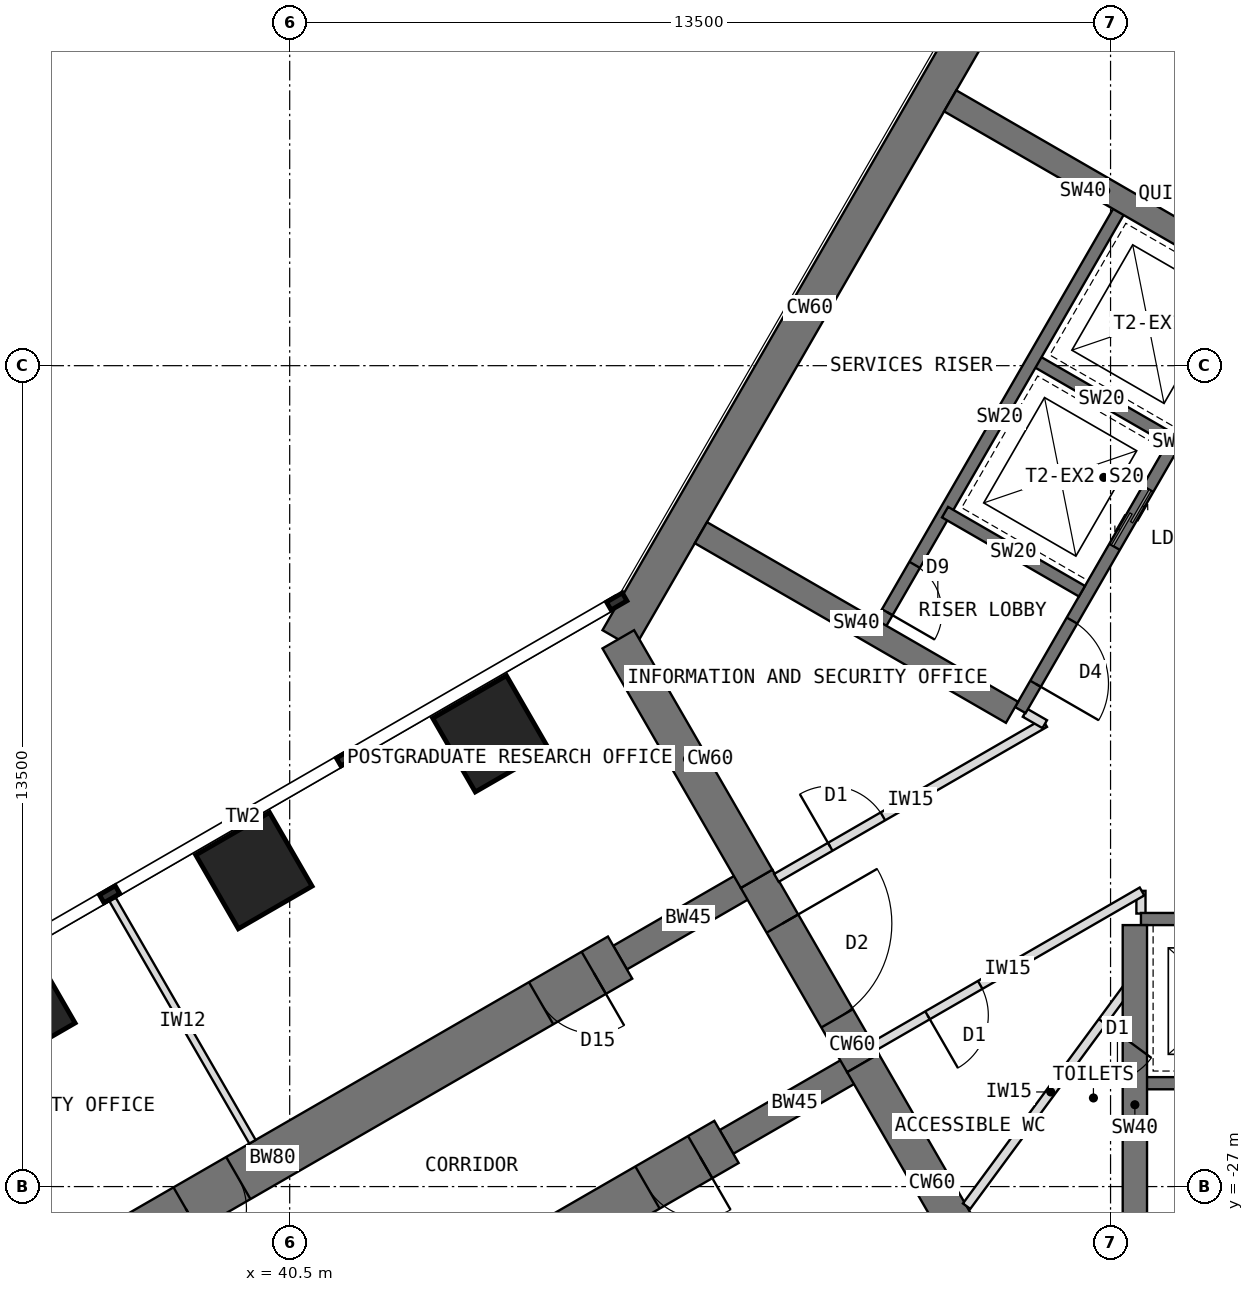
"""IFC4 building model, lengths in metres.
Left out: names, types, materials, properties, quantities, classifications, styles, units other than length and angle.
Written with IfcOpenShell. Run it as: python <this file> out.ifc"""

import sys

from ifc_helpers import new_model, si_unit, direction, frame, frame_2d, origin, origin_2d, place, context, subcontext, project, spatial, rectangle, extrude, element, fill, save


model = new_model("IFC4")
c1 = context("Model", 3, precision=1e-05, world=origin(), true_north=direction((0.0, 1.0)))
c2 = subcontext(c1, "Body", "Model", "MODEL_VIEW")
j1 = project(units=[si_unit("LENGTHUNIT", "METRE"), si_unit("PLANEANGLEUNIT", "RADIAN")], contexts=[c1])
p1 = place(None, origin())
s1 = spatial("IfcSite", under=j1, at=p1, CompositionType="ELEMENT")
p2 = place(p1, origin())
s2 = spatial("IfcBuilding", under=s1, at=p2, CompositionType="ELEMENT")
p3 = place(p2, frame((0.0, 0.0, 97.5)))
s3 = spatial("IfcBuildingStorey", under=s2, at=p3, CompositionType="ELEMENT", Elevation=97.5)
p4 = place(p3, frame((52.202, -7.092, 0.0), z_axis=(0.0, 0.0, 1.0), x_axis=(-0.500005998175, -0.866021940709, 0.0)))
e1 = element("IfcWall", 1, at=p4, inside=s3, PredefinedType="SHEAR", context=c2, shape_type="SweptSolid", body=[
    extrude(rectangle(XDim=12.596, YDim=0.6, at=frame_2d((6.298, 0.0))), origin(), (0.0, 0.0, 1.0), 4.0),
])
p5 = place(p3, frame((45.904, -18.0, 0.0), z_axis=(0.0, 0.0, 1.0), x_axis=(0.500024481964, -0.866011268655, 0.0)))
e2 = element("IfcWall", 2, at=p5, inside=s3, PredefinedType="SHEAR", context=c2, shape_type="SweptSolid", body=[
    extrude(rectangle(XDim=4.548, YDim=0.6, at=frame_2d((2.274, 0.0))), origin(), (0.0, 0.0, 1.0), 4.0),
])
p6 = place(p3, frame((48.178, -21.939, 0.0), z_axis=(0.0, 0.0, 1.0), x_axis=(0.500010275428, -0.866019471182, 0.0)))
e3 = element("IfcWall", 3, at=p6, inside=s3, PredefinedType="SHEAR", context=c2, shape_type="SweptSolid", body=[
    extrude(rectangle(XDim=3.5, YDim=0.6, at=frame_2d((1.75, 0.0))), origin(), (0.0, 0.0, 1.0), 4.0),
])
p7 = place(p6, frame((0.85, 0.0, 0.0)))
e4 = element("IfcOpeningElement", 4, at=p7, cuts=e3, PredefinedType="OPENING", context=c2, shape_type="SweptSolid", body=[
    extrude(rectangle(XDim=1.8, YDim=2.1, at=frame_2d((0.9, 1.05))), frame((0.0, 0.31, 0.0), z_axis=(0.0, -1.0, 0.0), x_axis=(1.0, 0.0, 0.0)), (0.0, 0.0, 1.0), 0.62),
])
p8 = place(p3, frame((49.928, -24.97, 0.0), z_axis=(0.0, 0.0, 1.0), x_axis=(0.499984222037, -0.866034513004, 0.0)))
e5 = element("IfcWall", 5, at=p8, inside=s3, PredefinedType="SHEAR", context=c2, shape_type="SweptSolid", body=[
    extrude(rectangle(XDim=4.548, YDim=0.6, at=frame_2d((2.274, 0.0))), origin(), (0.0, 0.0, 1.0), 4.0),
])
p9 = place(p3, frame((49.928, -24.97, 0.0), z_axis=(0.0, 0.0, 1.0), x_axis=(-0.866031863473, -0.499988811324, 0.0)))
e6 = element("IfcWall", 6, at=p9, inside=s3, PredefinedType="SHEAR", context=c2, shape_type="SweptSolid", body=[
    extrude(rectangle(XDim=2.592, YDim=0.45, at=frame_2d((1.296, 0.0))), origin(), (0.0, 0.0, 1.0), 4.0),
])
p10 = place(p3, frame((47.684, -26.266, 0.0), z_axis=(0.0, 0.0, 1.0), x_axis=(-0.866027579429, -0.499996231654, 0.0)))
e7 = element("IfcWall", 7, at=p10, inside=s3, PredefinedType="SHEAR", context=c2, shape_type="SweptSolid", body=[
    extrude(rectangle(XDim=13.2, YDim=0.8, at=frame_2d((6.6, 0.0))), origin(), (0.0, 0.0, 1.0), 4.0),
])
p11 = place(p10, frame((0.5, 0.0, 0.0)))
e8 = element("IfcOpeningElement", 8, at=p11, cuts=e7, PredefinedType="OPENING", context=c2, shape_type="SweptSolid", body=[
    extrude(rectangle(XDim=1.0, YDim=2.1, at=frame_2d((0.5, 1.05))), frame((0.0, 0.41, 0.0), z_axis=(0.0, -1.0, 0.0), x_axis=(1.0, 0.0, 0.0)), (0.0, 0.0, 1.0), 0.82),
])
p12 = place(p10, frame((7.25, 0.0, 0.0)))
e9 = element("IfcOpeningElement", 9, at=p12, cuts=e7, PredefinedType="OPENING", context=c2, shape_type="SweptSolid", body=[
    extrude(rectangle(XDim=1.0, YDim=2.1, at=frame_2d((0.5, 1.05))), frame((0.0, 0.41, 0.0), z_axis=(0.0, -1.0, 0.0), x_axis=(1.0, 0.0, 0.0)), (0.0, 0.0, 1.0), 0.82),
])
p13 = place(p3, frame((48.178, -21.939, 0.0), z_axis=(0.0, 0.0, 1.0), x_axis=(-0.866072649678, -0.499918158782, 0.0)))
e10 = element("IfcWall", 10, at=p13, inside=s3, PredefinedType="SHEAR", context=c2, shape_type="SweptSolid", body=[
    extrude(rectangle(XDim=2.592, YDim=0.45, at=frame_2d((1.296, 0.0))), origin(), (0.0, 0.0, 1.0), 4.0),
])
p14 = place(p3, frame((45.934, -23.234, 0.0), z_axis=(0.0, 0.0, 1.0), x_axis=(-0.866019570528, -0.500010103361, 0.0)))
e11 = element("IfcWall", 11, at=p14, inside=s3, PredefinedType="SHEAR", context=c2, shape_type="SweptSolid", body=[
    extrude(rectangle(XDim=13.2, YDim=0.8, at=frame_2d((6.6, 0.0))), origin(), (0.0, 0.0, 1.0), 4.0),
])
p15 = place(p14, frame((0.5, 0.0, 0.0)))
e12 = element("IfcOpeningElement", 12, at=p15, cuts=e11, PredefinedType="OPENING", context=c2, shape_type="SweptSolid", body=[
    extrude(rectangle(XDim=1.0, YDim=2.1, at=frame_2d((0.5, 1.05))), frame((0.0, 0.41, 0.0), z_axis=(0.0, -1.0, 0.0), x_axis=(1.0, 0.0, 0.0)), (0.0, 0.0, 1.0), 0.82),
])
p16 = place(p14, frame((7.25, 0.0, 0.0)))
e13 = element("IfcOpeningElement", 13, at=p16, cuts=e11, PredefinedType="OPENING", context=c2, shape_type="SweptSolid", body=[
    extrude(rectangle(XDim=1.0, YDim=2.1, at=frame_2d((0.5, 1.05))), frame((0.0, 0.41, 0.0), z_axis=(0.0, -1.0, 0.0), x_axis=(1.0, 0.0, 0.0)), (0.0, 0.0, 1.0), 0.82),
])
for number, where, z_axis, x_axis in (
    (14, (43.809, -19.554, 0.0), (0.0, 0.0, 1.0), (0.866, 0.5, 0.0)),
    (15, (39.912, -21.804, 0.0), (0.0, 0.0, 1.0), (0.866, 0.5, 0.0)),
    (16, (36.014, -24.054, 0.0), (0.0, 0.0, 1.0), (0.866, 0.5, 0.0)),
):
    element("IfcColumn", number, at=place(p3, frame(where, z_axis=z_axis, x_axis=x_axis)), inside=s3, PredefinedType="COLUMN", context=c2, shape_type="SweptSolid", body=[
        extrude(rectangle(XDim=1.4, YDim=1.4, at=origin_2d()), origin(), (0.0, 0.0, 1.0), 4.0),
    ])
p17 = place(p3, frame((56.516, -12.236, 0.0), z_axis=(0.0, 0.0, 1.0), x_axis=(-0.49999894854, -0.866026010844, 0.0)))
e17 = element("IfcWall", 17, at=p17, inside=s3, PredefinedType="SHEAR", context=c2, shape_type="SweptSolid", body=[
    extrude(rectangle(XDim=8.0, YDim=0.2, at=frame_2d((4.0, 0.0))), origin(), (0.0, 0.0, 1.0), 4.0),
])
p18 = place(p17, frame((6.3, 0.0, 0.0)))
e18 = element("IfcOpeningElement", 18, at=p18, cuts=e17, PredefinedType="OPENING", context=c2, shape_type="SweptSolid", body=[
    extrude(rectangle(XDim=1.2, YDim=2.1, at=frame_2d((0.6, 1.05))), frame((0.0, 0.11, 0.0), z_axis=(0.0, -1.0, 0.0), x_axis=(1.0, 0.0, 0.0)), (0.0, 0.0, 1.0), 0.22),
])
p19 = place(p17, frame((0.9, 0.0, 0.0)))
e19 = element("IfcOpeningElement", 19, at=p19, cuts=e17, PredefinedType="OPENING", context=c2, shape_type="SweptSolid", body=[
    extrude(rectangle(XDim=1.1, YDim=2.2, at=frame_2d((0.55, 1.1))), frame((0.0, 0.11, 0.0), z_axis=(0.0, -1.0, 0.0), x_axis=(1.0, 0.0, 0.0)), (0.0, 0.0, 1.0), 0.22),
])
p20 = place(p17, frame((3.8, 0.0, 0.0)))
e20 = element("IfcOpeningElement", 20, at=p20, cuts=e17, PredefinedType="OPENING", context=c2, shape_type="SweptSolid", body=[
    extrude(rectangle(XDim=1.1, YDim=2.2, at=frame_2d((0.55, 1.1))), frame((0.0, 0.11, 0.0), z_axis=(0.0, -1.0, 0.0), x_axis=(1.0, 0.0, 0.0)), (0.0, 0.0, 1.0), 0.22),
])
for number, where, z_axis, x_axis in (
    (21, (54.98, -14.697, 0.0), (0.0, 0.0, 1.0), (-0.866, 0.5, 0.0)),
    (22, (53.53, -17.209, 0.0), (0.0, 0.0, 1.0), (-0.866, 0.5, 0.0)),
):
    element("IfcWall", number, at=place(p3, frame(where, z_axis=z_axis, x_axis=x_axis)), inside=s3, PredefinedType="SHEAR", context=c2, shape_type="SweptSolid", body=[
        extrude(rectangle(XDim=2.6, YDim=0.2, at=frame_2d((1.3, 0.0))), origin(), (0.0, 0.0, 1.0), 4.0),
    ])
p21 = place(p3, frame((54.178, -10.886, 0.0), z_axis=(0.0, 0.0, 1.0), x_axis=(-0.49999894854, -0.866026010844, 0.0)))
e23 = element("IfcWall", 23, at=p21, inside=s3, PredefinedType="SHEAR", context=c2, shape_type="SweptSolid", body=[
    extrude(rectangle(XDim=8.0, YDim=0.2, at=frame_2d((4.0, 0.0))), origin(), (0.0, 0.0, 1.0), 4.0),
])
p22 = place(p21, frame((6.8, 0.0, 0.0)))
e24 = element("IfcOpeningElement", 24, at=p22, cuts=e23, PredefinedType="OPENING", context=c2, shape_type="SweptSolid", body=[
    extrude(rectangle(XDim=0.9, YDim=2.1, at=frame_2d((0.45, 1.05))), frame((0.0, 0.11, 0.0), z_axis=(0.0, -1.0, 0.0), x_axis=(1.0, 0.0, 0.0)), (0.0, 0.0, 1.0), 0.22),
])
p23 = place(p3, frame((52.38, -19.201, 0.0), z_axis=(0.0, 0.0, 1.0), x_axis=(-0.866027317282, 0.49999668571, 0.0)))
e25 = element("IfcWall", 25, at=p23, inside=s3, PredefinedType="SHEAR", context=c2, shape_type="SweptSolid", body=[
    extrude(rectangle(XDim=5.908, YDim=0.4, at=frame_2d((2.954, 0.0))), origin(), (0.0, 0.0, 1.0), 4.0),
])
p24 = place(p3, frame((56.48, -12.099, 0.0), z_axis=(0.0, 0.0, 1.0), x_axis=(-0.866009424208, 0.500027676417, 0.0)))
e26 = element("IfcWall", 26, at=p24, inside=s3, PredefinedType="SHEAR", context=c2, shape_type="SweptSolid", body=[
    extrude(rectangle(XDim=5.908, YDim=0.4, at=frame_2d((2.954, 0.0))), origin(), (0.0, 0.0, 1.0), 4.0),
])
p25 = place(p3, frame((54.5, -22.6, 0.0), z_axis=(0.0, 0.0, 1.0), x_axis=(1.0, 0.0, 0.0)))
e27 = element("IfcWall", 27, at=p25, inside=s3, PredefinedType="SHEAR", context=c2, shape_type="SweptSolid", body=[
    extrude(rectangle(XDim=8.0, YDim=0.2, at=frame_2d((4.0, 0.0))), origin(), (0.0, 0.0, 1.0), 4.0),
])
p26 = place(p25, frame((6.3, 0.0, 0.0)))
e28 = element("IfcOpeningElement", 28, at=p26, cuts=e27, PredefinedType="OPENING", context=c2, shape_type="SweptSolid", body=[
    extrude(rectangle(XDim=1.2, YDim=2.1, at=frame_2d((0.6, 1.05))), frame((0.0, 0.11, 0.0), z_axis=(0.0, -1.0, 0.0), x_axis=(1.0, 0.0, 0.0)), (0.0, 0.0, 1.0), 0.22),
])
p27 = place(p25, frame((0.9, 0.0, 0.0)))
e29 = element("IfcOpeningElement", 29, at=p27, cuts=e27, PredefinedType="OPENING", context=c2, shape_type="SweptSolid", body=[
    extrude(rectangle(XDim=1.1, YDim=2.2, at=frame_2d((0.55, 1.1))), frame((0.0, 0.11, 0.0), z_axis=(0.0, -1.0, 0.0), x_axis=(1.0, 0.0, 0.0)), (0.0, 0.0, 1.0), 0.22),
])
p28 = place(p3, frame((54.5, -25.3, 0.0), z_axis=(0.0, 0.0, 1.0), x_axis=(1.0, 0.0, 0.0)))
e30 = element("IfcWall", 30, at=p28, inside=s3, PredefinedType="SHEAR", context=c2, shape_type="SweptSolid", body=[
    extrude(rectangle(XDim=8.0, YDim=0.2, at=frame_2d((4.0, 0.0))), origin(), (0.0, 0.0, 1.0), 4.0),
])
p29 = place(p28, frame((6.7, 0.0, 0.0)))
e31 = element("IfcOpeningElement", 31, at=p29, cuts=e30, PredefinedType="OPENING", context=c2, shape_type="SweptSolid", body=[
    extrude(rectangle(XDim=1.1, YDim=2.1, at=frame_2d((0.55, 1.05))), frame((0.0, 0.11, 0.0), z_axis=(0.0, -1.0, 0.0), x_axis=(1.0, 0.0, 0.0)), (0.0, 0.0, 1.0), 0.22),
])
p30 = place(p3, frame((54.4, -22.7, 0.0), z_axis=(0.0, 0.0, 1.0), x_axis=(0.0, -1.0, 0.0)))
e32 = element("IfcWall", 32, at=p30, inside=s3, PredefinedType="SHEAR", context=c2, shape_type="SweptSolid", body=[
    extrude(rectangle(XDim=5.908, YDim=0.4, at=frame_2d((2.954, 0.0))), origin(), (0.0, 0.0, 1.0), 4.0),
])
p31 = place(p3, frame((39.888, -26.263, 0.0), z_axis=(0.0, 0.0, 1.0), x_axis=(-0.500014953309, 0.866016770315, 0.0)))
e33 = element("IfcWall", 33, at=p31, inside=s3, PredefinedType="PARTITIONING", context=c2, shape_type="SweptSolid", body=[
    extrude(rectangle(XDim=4.6, YDim=0.12, at=frame_2d((2.3, 0.0))), origin(), (0.0, 0.0, 1.0), 3.8),
])
p32 = place(p3, frame((54.5, -22.51, 0.0), z_axis=(0.0, 0.0, 1.0), x_axis=(0.0, 1.0, 0.0)))
e34 = element("IfcWall", 34, at=p32, inside=s3, PredefinedType="PARTITIONING", context=c2, shape_type="SweptSolid", body=[
    extrude(rectangle(XDim=0.373, YDim=0.15, at=frame_2d((0.187, 0.0))), origin(), (0.0, 0.0, 1.0), 3.8),
])
p33 = place(p3, frame((54.517, -22.147, 0.0), z_axis=(0.0, 0.0, 1.0), x_axis=(-0.866029209911, -0.499993407537, 0.0)))
e35 = element("IfcWall", 35, at=p33, inside=s3, PredefinedType="PARTITIONING", context=c2, shape_type="SweptSolid", body=[
    extrude(rectangle(XDim=5.096, YDim=0.15, at=frame_2d((2.548, 0.0))), origin(), (0.0, 0.0, 1.0), 3.8),
])
p34 = place(p33, frame((3.073, 0.0, 0.0)))
e36 = element("IfcOpeningElement", 36, at=p34, cuts=e35, PredefinedType="OPENING", context=c2, shape_type="SweptSolid", body=[
    extrude(rectangle(XDim=1.0, YDim=2.1, at=frame_2d((0.5, 1.05))), frame((0.0, 0.085, 0.0), z_axis=(0.0, -1.0, 0.0), x_axis=(1.0, 0.0, 0.0)), (0.0, 0.0, 1.0), 0.17),
])
p35 = place(p3, frame((48.504, -21.924, 0.0), z_axis=(0.0, 0.0, 1.0), x_axis=(0.865996484538, 0.500050086259, 0.0)))
e37 = element("IfcWall", 37, at=p35, inside=s3, PredefinedType="PARTITIONING", context=c2, shape_type="SweptSolid", body=[
    extrude(rectangle(XDim=5.096, YDim=0.15, at=frame_2d((2.548, 0.0))), origin(), (0.0, 0.0, 1.0), 3.8),
])
p36 = place(p35, frame((1.023, 0.0, 0.0)))
e38 = element("IfcOpeningElement", 38, at=p36, cuts=e37, PredefinedType="OPENING", context=c2, shape_type="SweptSolid", body=[
    extrude(rectangle(XDim=1.0, YDim=2.1, at=frame_2d((0.5, 1.05))), frame((0.0, 0.085, 0.0), z_axis=(0.0, -1.0, 0.0), x_axis=(1.0, 0.0, 0.0)), (0.0, 0.0, 1.0), 0.17),
])
p37 = place(p3, frame((52.917, -19.396, 0.0), z_axis=(0.0, 0.0, 1.0), x_axis=(-0.865978465477, 0.500081290722, 0.0)))
e39 = element("IfcWall", 39, at=p37, inside=s3, PredefinedType="PARTITIONING", context=c2, shape_type="SweptSolid", body=[
    extrude(rectangle(XDim=0.373, YDim=0.15, at=frame_2d((0.187, 0.0))), origin(), (0.0, 0.0, 1.0), 3.8),
])
p38 = place(p3, frame((54.4, -23.566, 0.0), z_axis=(0.0, 0.0, 1.0), x_axis=(-0.59307051543, -0.805150522404, 0.0)))
e40 = element("IfcWall", 40, at=p38, inside=s3, PredefinedType="PARTITIONING", context=c2, shape_type="SweptSolid", body=[
    extrude(rectangle(XDim=4.666, YDim=0.15, at=frame_2d((2.333, 0.0))), origin(), (0.0, 0.0, 1.0), 3.8),
])
p39 = place(p38, frame((0.9, 0.0, 0.0)))
e41 = element("IfcOpeningElement", 41, at=p39, cuts=e40, PredefinedType="OPENING", context=c2, shape_type="SweptSolid", body=[
    extrude(rectangle(XDim=1.0, YDim=2.1, at=frame_2d((0.5, 1.05))), frame((0.0, 0.085, 0.0), z_axis=(0.0, -1.0, 0.0), x_axis=(1.0, 0.0, 0.0)), (0.0, 0.0, 1.0), 0.17),
])
p40 = place(p18, origin())
e42 = element("IfcDoor", 42, at=p40, inside=s3, OperationType="SINGLE_SWING_RIGHT", PredefinedType="DOOR", context=c2, shape_type="SweptSolid", body=[
    extrude(rectangle(XDim=1.2, YDim=2.1, at=frame_2d((0.6, 1.05))), frame((0.0, 0.025, 0.0), z_axis=(0.0, -1.0, 0.0), x_axis=(1.0, 0.0, 0.0)), (0.0, 0.0, 1.0), 0.05),
])
fill(e18, e42)
p41 = place(p20, origin())
e43 = element("IfcDoor", 43, at=p41, inside=s3, OperationType="DOUBLE_DOOR_SLIDING", PredefinedType="DOOR", context=c2, shape_type="SweptSolid", body=[
    extrude(rectangle(XDim=1.1, YDim=2.2, at=frame_2d((0.55, 1.1))), frame((0.0, 0.025, 0.0), z_axis=(0.0, -1.0, 0.0), x_axis=(1.0, 0.0, 0.0)), (0.0, 0.0, 1.0), 0.05),
])
fill(e20, e43)
p42 = place(p22, origin())
e44 = element("IfcDoor", 44, at=p42, inside=s3, OperationType="SINGLE_SWING_RIGHT", PredefinedType="DOOR", context=c2, shape_type="SweptSolid", body=[
    extrude(rectangle(XDim=0.9, YDim=2.1, at=frame_2d((0.45, 1.05))), frame((0.0, 0.025, 0.0), z_axis=(0.0, -1.0, 0.0), x_axis=(1.0, 0.0, 0.0)), (0.0, 0.0, 1.0), 0.05),
])
fill(e24, e44)
p43 = place(p7, origin())
e45 = element("IfcDoor", 45, at=p43, inside=s3, OperationType="DOUBLE_DOOR_DOUBLE_SWING", PredefinedType="DOOR", context=c2, shape_type="SweptSolid", body=[
    extrude(rectangle(XDim=1.72, YDim=2.06, at=frame_2d((0.9, 1.03))), frame((0.0, 0.025, 0.0), z_axis=(0.0, -1.0, 0.0), x_axis=(1.0, 0.0, 0.0)), (0.0, 0.0, 1.0), 0.05),
    extrude(rectangle(XDim=0.04, YDim=2.1, at=frame_2d((0.02, 1.05))), frame((0.0, 0.3, 0.0), z_axis=(0.0, -1.0, 0.0), x_axis=(1.0, 0.0, 0.0)), (0.0, 0.0, 1.0), 0.6),
    extrude(rectangle(XDim=0.04, YDim=2.1, at=frame_2d((1.78, 1.05))), frame((0.0, 0.3, 0.0), z_axis=(0.0, -1.0, 0.0), x_axis=(1.0, 0.0, 0.0)), (0.0, 0.0, 1.0), 0.6),
    extrude(rectangle(XDim=1.72, YDim=0.04, at=frame_2d((0.9, 2.08))), frame((0.0, 0.3, 0.0), z_axis=(0.0, -1.0, 0.0), x_axis=(1.0, 0.0, 0.0)), (0.0, 0.0, 1.0), 0.6),
])
fill(e4, e45)
p44 = place(p36, origin())
e46 = element("IfcDoor", 46, at=p44, inside=s3, OperationType="SINGLE_SWING_LEFT", PredefinedType="DOOR", context=c2, shape_type="SweptSolid", body=[
    extrude(rectangle(XDim=1.0, YDim=2.1, at=frame_2d((0.5, 1.05))), frame((0.0, 0.025, 0.0), z_axis=(0.0, -1.0, 0.0), x_axis=(1.0, 0.0, 0.0)), (0.0, 0.0, 1.0), 0.05),
])
fill(e38, e46)
p45 = place(p34, origin())
e47 = element("IfcDoor", 47, at=p45, inside=s3, OperationType="SINGLE_SWING_RIGHT", PredefinedType="DOOR", context=c2, shape_type="SweptSolid", body=[
    extrude(rectangle(XDim=1.0, YDim=2.1, at=frame_2d((0.5, 1.05))), frame((0.0, 0.025, 0.0), z_axis=(0.0, -1.0, 0.0), x_axis=(1.0, 0.0, 0.0)), (0.0, 0.0, 1.0), 0.05),
])
fill(e36, e47)
p46 = place(p39, origin())
e48 = element("IfcDoor", 48, at=p46, inside=s3, OperationType="SINGLE_SWING_LEFT", PredefinedType="DOOR", context=c2, shape_type="SweptSolid", body=[
    extrude(rectangle(XDim=1.0, YDim=2.1, at=frame_2d((0.5, 1.05))), frame((0.0, 0.025, 0.0), z_axis=(0.0, -1.0, 0.0), x_axis=(1.0, 0.0, 0.0)), (0.0, 0.0, 1.0), 0.05),
])
fill(e41, e48)
p47 = place(p11, origin())
e49 = element("IfcDoor", 49, at=p47, inside=s3, OperationType="SINGLE_SWING_LEFT", PredefinedType="DOOR", context=c2, shape_type="SweptSolid", body=[
    extrude(rectangle(XDim=0.92, YDim=2.06, at=frame_2d((0.5, 1.03))), frame((0.0, 0.025, 0.0), z_axis=(0.0, -1.0, 0.0), x_axis=(1.0, 0.0, 0.0)), (0.0, 0.0, 1.0), 0.05),
    extrude(rectangle(XDim=0.04, YDim=2.1, at=frame_2d((0.02, 1.05))), frame((0.0, 0.4, 0.0), z_axis=(0.0, -1.0, 0.0), x_axis=(1.0, 0.0, 0.0)), (0.0, 0.0, 1.0), 0.8),
    extrude(rectangle(XDim=0.04, YDim=2.1, at=frame_2d((0.98, 1.05))), frame((0.0, 0.4, 0.0), z_axis=(0.0, -1.0, 0.0), x_axis=(1.0, 0.0, 0.0)), (0.0, 0.0, 1.0), 0.8),
    extrude(rectangle(XDim=0.92, YDim=0.04, at=frame_2d((0.5, 2.08))), frame((0.0, 0.4, 0.0), z_axis=(0.0, -1.0, 0.0), x_axis=(1.0, 0.0, 0.0)), (0.0, 0.0, 1.0), 0.8),
])
fill(e8, e49)
p48 = place(p15, origin())
e50 = element("IfcDoor", 50, at=p48, inside=s3, OperationType="SINGLE_SWING_LEFT", PredefinedType="DOOR", context=c2, shape_type="SweptSolid", body=[
    extrude(rectangle(XDim=0.92, YDim=2.06, at=frame_2d((0.5, 1.03))), frame((0.0, 0.025, 0.0), z_axis=(0.0, -1.0, 0.0), x_axis=(1.0, 0.0, 0.0)), (0.0, 0.0, 1.0), 0.05),
    extrude(rectangle(XDim=0.04, YDim=2.1, at=frame_2d((0.02, 1.05))), frame((0.0, 0.4, 0.0), z_axis=(0.0, -1.0, 0.0), x_axis=(1.0, 0.0, 0.0)), (0.0, 0.0, 1.0), 0.8),
    extrude(rectangle(XDim=0.04, YDim=2.1, at=frame_2d((0.98, 1.05))), frame((0.0, 0.4, 0.0), z_axis=(0.0, -1.0, 0.0), x_axis=(1.0, 0.0, 0.0)), (0.0, 0.0, 1.0), 0.8),
    extrude(rectangle(XDim=0.92, YDim=0.04, at=frame_2d((0.5, 2.08))), frame((0.0, 0.4, 0.0), z_axis=(0.0, -1.0, 0.0), x_axis=(1.0, 0.0, 0.0)), (0.0, 0.0, 1.0), 0.8),
])
fill(e12, e50)
p49 = place(p16, origin())
e51 = element("IfcDoor", 51, at=p49, inside=s3, OperationType="SINGLE_SWING_RIGHT", PredefinedType="DOOR", context=c2, shape_type="SweptSolid", body=[
    extrude(rectangle(XDim=0.92, YDim=2.06, at=frame_2d((0.5, 1.03))), frame((0.0, 0.025, 0.0), z_axis=(0.0, -1.0, 0.0), x_axis=(1.0, 0.0, 0.0)), (0.0, 0.0, 1.0), 0.05),
    extrude(rectangle(XDim=0.04, YDim=2.1, at=frame_2d((0.02, 1.05))), frame((0.0, 0.4, 0.0), z_axis=(0.0, -1.0, 0.0), x_axis=(1.0, 0.0, 0.0)), (0.0, 0.0, 1.0), 0.8),
    extrude(rectangle(XDim=0.04, YDim=2.1, at=frame_2d((0.98, 1.05))), frame((0.0, 0.4, 0.0), z_axis=(0.0, -1.0, 0.0), x_axis=(1.0, 0.0, 0.0)), (0.0, 0.0, 1.0), 0.8),
    extrude(rectangle(XDim=0.92, YDim=0.04, at=frame_2d((0.5, 2.08))), frame((0.0, 0.4, 0.0), z_axis=(0.0, -1.0, 0.0), x_axis=(1.0, 0.0, 0.0)), (0.0, 0.0, 1.0), 0.8),
])
fill(e13, e51)
save(model, sys.argv[1])
